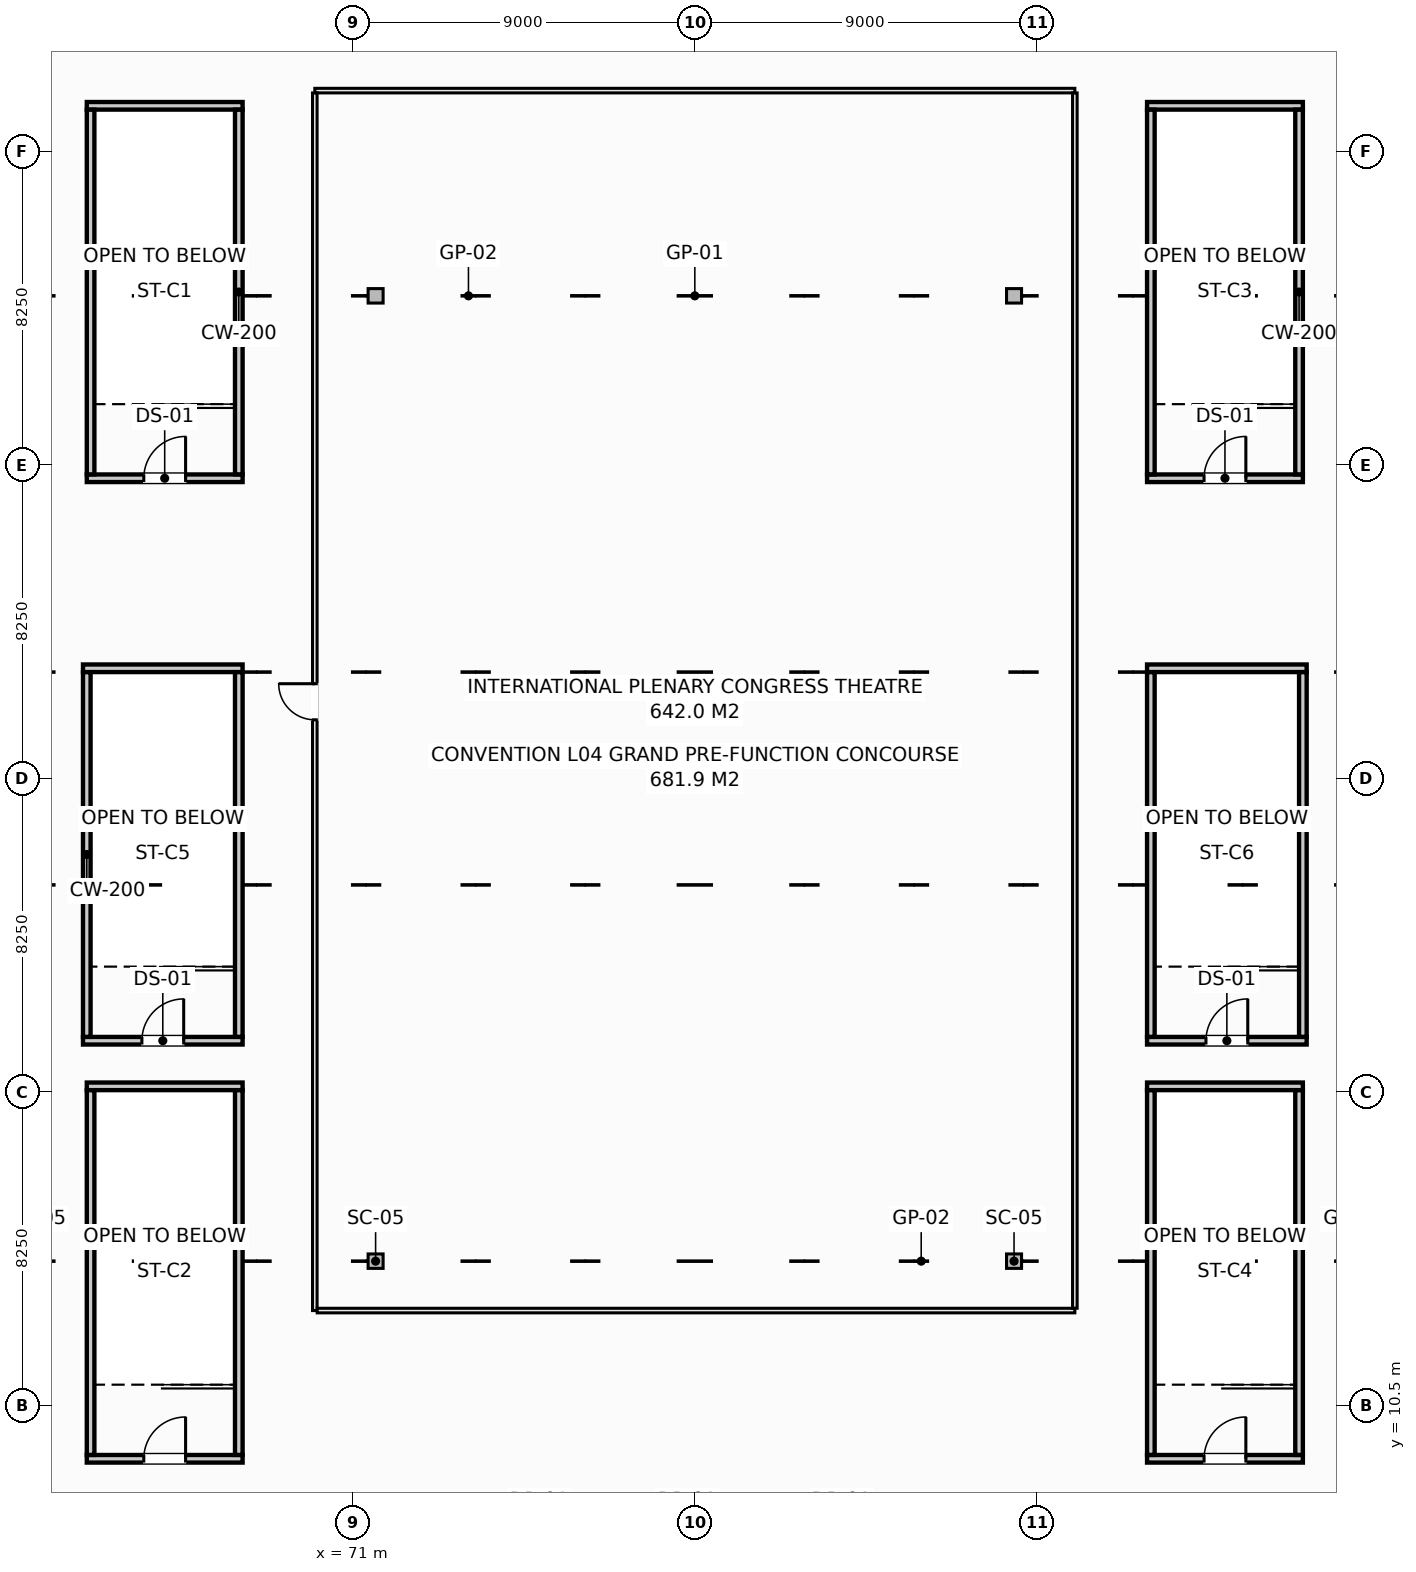
"""IFC4 building model, lengths in metres.
Left out: names, types, materials, properties, quantities, classifications, styles, units other than length and angle.
Written with IfcOpenShell. Run it as: python <this file> out.ifc"""

import sys

from ifc_helpers import new_model, si_unit, direction, frame, frame_2d, origin, origin_2d, place, context, subcontext, project, spatial, rectangle, i_section, extrude, element, fill, save


model = new_model("IFC4")
c1 = context("Model", 3, precision=1e-05, world=origin(), true_north=direction((0.0, 1.0)))
c2 = subcontext(c1, "Body", "Model", "MODEL_VIEW")
j1 = project(units=[si_unit("LENGTHUNIT", "METRE"), si_unit("PLANEANGLEUNIT", "RADIAN")], contexts=[c1])
p1 = place(None, origin())
s1 = spatial("IfcSite", under=j1, at=p1, CompositionType="ELEMENT")
p2 = place(p1, origin())
s2 = spatial("IfcBuilding", under=s1, at=p2, CompositionType="ELEMENT")
p3 = place(p2, frame((0.0, 0.0, 21.0)))
s3 = spatial("IfcBuildingStorey", under=s2, at=p3, CompositionType="ELEMENT", Elevation=21.0)
for number, where, z_axis, x_axis in (
    (1, (71.6, 14.3, -0.24), (0.0, 0.0, 1.0), (1.0, 0.0, 0.0)),
    (2, (71.6, 39.7, -0.24), (0.0, 0.0, 1.0), (1.0, 0.0, 0.0)),
    (3, (88.4, 14.3, -0.24), (0.0, 0.0, 1.0), (1.0, 0.0, 0.0)),
    (4, (88.4, 39.7, -0.24), (0.0, 0.0, 1.0), (1.0, 0.0, 0.0)),
):
    element("IfcColumn", number, at=place(p3, frame(where, z_axis=z_axis, x_axis=x_axis)), inside=s3, PredefinedType="COLUMN", context=c2, shape_type="SweptSolid", body=[
        extrude(i_section(OverallWidth=0.395, OverallDepth=0.38, WebThickness=0.019, FlangeThickness=0.03, at=origin_2d()), origin(), (0.0, 0.0, 1.0), 5.49),
    ])
p4 = place(p3, frame((64.0, 34.9, -0.24), z_axis=(0.0, 0.0, 1.0), x_axis=(1.0, 0.0, 0.0)))
e5 = element("IfcWall", 5, at=p4, inside=s3, PredefinedType="SHEAR", context=c2, shape_type="SweptSolid", body=[
    extrude(rectangle(XDim=4.1, YDim=0.2, at=frame_2d((2.05, 0.0))), origin(), (0.0, 0.0, 1.0), 5.49),
])
p5 = place(p4, frame((1.5, 0.0, 0.24)))
e6 = element("IfcOpeningElement", 6, at=p5, cuts=e5, PredefinedType="OPENING", context=c2, shape_type="SweptSolid", body=[
    extrude(rectangle(XDim=1.1, YDim=2.15, at=frame_2d((0.55, 1.075))), frame((0.0, 0.11, 0.0), z_axis=(0.0, -1.0, 0.0), x_axis=(1.0, 0.0, 0.0)), (0.0, 0.0, 1.0), 0.22),
])
p6 = place(p3, frame((64.0, 44.7, -0.24), z_axis=(0.0, 0.0, 1.0), x_axis=(1.0, 0.0, 0.0)))
e7 = element("IfcWall", 7, at=p6, inside=s3, PredefinedType="SHEAR", context=c2, shape_type="SweptSolid", body=[
    extrude(rectangle(XDim=4.1, YDim=0.2, at=frame_2d((2.05, 0.0))), origin(), (0.0, 0.0, 1.0), 5.49),
])
for number, where, z_axis, x_axis in (
    (8, (64.1, 35.002, -0.24), (0.0, 0.0, 1.0), (0.0, 1.0, 0.0)),
    (9, (68.0, 35.002, -0.24), (0.0, 0.0, 1.0), (0.0, 1.0, 0.0)),
):
    element("IfcWall", number, at=place(p3, frame(where, z_axis=z_axis, x_axis=x_axis)), inside=s3, PredefinedType="SHEAR", context=c2, shape_type="SweptSolid", body=[
        extrude(rectangle(XDim=9.596, YDim=0.2, at=frame_2d((4.798, 0.0))), origin(), (0.0, 0.0, 1.0), 5.49),
    ])
p7 = place(p3, frame((64.0, 9.1, -0.24), z_axis=(0.0, 0.0, 1.0), x_axis=(1.0, 0.0, 0.0)))
e10 = element("IfcWall", 10, at=p7, inside=s3, PredefinedType="SHEAR", context=c2, shape_type="SweptSolid", body=[
    extrude(rectangle(XDim=4.1, YDim=0.2, at=frame_2d((2.05, 0.0))), origin(), (0.0, 0.0, 1.0), 5.49),
])
p8 = place(p7, frame((1.5, 0.0, 0.24)))
e11 = element("IfcOpeningElement", 11, at=p8, cuts=e10, PredefinedType="OPENING", context=c2, shape_type="SweptSolid", body=[
    extrude(rectangle(XDim=1.1, YDim=2.15, at=frame_2d((0.55, 1.075))), frame((0.0, 0.11, 0.0), z_axis=(0.0, -1.0, 0.0), x_axis=(1.0, 0.0, 0.0)), (0.0, 0.0, 1.0), 0.22),
])
p9 = place(p3, frame((64.0, 18.9, -0.24), z_axis=(0.0, 0.0, 1.0), x_axis=(1.0, 0.0, 0.0)))
e12 = element("IfcWall", 12, at=p9, inside=s3, PredefinedType="SHEAR", context=c2, shape_type="SweptSolid", body=[
    extrude(rectangle(XDim=4.1, YDim=0.2, at=frame_2d((2.05, 0.0))), origin(), (0.0, 0.0, 1.0), 5.49),
])
for number, where, z_axis, x_axis in (
    (13, (64.1, 9.202, -0.24), (0.0, 0.0, 1.0), (0.0, 1.0, 0.0)),
    (14, (68.0, 9.202, -0.24), (0.0, 0.0, 1.0), (0.0, 1.0, 0.0)),
):
    element("IfcWall", number, at=place(p3, frame(where, z_axis=z_axis, x_axis=x_axis)), inside=s3, PredefinedType="SHEAR", context=c2, shape_type="SweptSolid", body=[
        extrude(rectangle(XDim=9.596, YDim=0.2, at=frame_2d((4.798, 0.0))), origin(), (0.0, 0.0, 1.0), 5.49),
    ])
p10 = place(p3, frame((91.9, 34.9, -0.24), z_axis=(0.0, 0.0, 1.0), x_axis=(1.0, 0.0, 0.0)))
e15 = element("IfcWall", 15, at=p10, inside=s3, PredefinedType="SHEAR", context=c2, shape_type="SweptSolid", body=[
    extrude(rectangle(XDim=4.1, YDim=0.2, at=frame_2d((2.05, 0.0))), origin(), (0.0, 0.0, 1.0), 5.49),
])
p11 = place(p10, frame((1.5, 0.0, 0.24)))
e16 = element("IfcOpeningElement", 16, at=p11, cuts=e15, PredefinedType="OPENING", context=c2, shape_type="SweptSolid", body=[
    extrude(rectangle(XDim=1.1, YDim=2.15, at=frame_2d((0.55, 1.075))), frame((0.0, 0.11, 0.0), z_axis=(0.0, -1.0, 0.0), x_axis=(1.0, 0.0, 0.0)), (0.0, 0.0, 1.0), 0.22),
])
p12 = place(p3, frame((91.9, 44.7, -0.24), z_axis=(0.0, 0.0, 1.0), x_axis=(1.0, 0.0, 0.0)))
e17 = element("IfcWall", 17, at=p12, inside=s3, PredefinedType="SHEAR", context=c2, shape_type="SweptSolid", body=[
    extrude(rectangle(XDim=4.1, YDim=0.2, at=frame_2d((2.05, 0.0))), origin(), (0.0, 0.0, 1.0), 5.49),
])
for number, where, z_axis, x_axis in (
    (18, (92.0, 35.002, -0.24), (0.0, 0.0, 1.0), (0.0, 1.0, 0.0)),
    (19, (95.9, 35.002, -0.24), (0.0, 0.0, 1.0), (0.0, 1.0, 0.0)),
):
    element("IfcWall", number, at=place(p3, frame(where, z_axis=z_axis, x_axis=x_axis)), inside=s3, PredefinedType="SHEAR", context=c2, shape_type="SweptSolid", body=[
        extrude(rectangle(XDim=9.596, YDim=0.2, at=frame_2d((4.798, 0.0))), origin(), (0.0, 0.0, 1.0), 5.49),
    ])
p13 = place(p3, frame((91.9, 9.1, -0.24), z_axis=(0.0, 0.0, 1.0), x_axis=(1.0, 0.0, 0.0)))
e20 = element("IfcWall", 20, at=p13, inside=s3, PredefinedType="SHEAR", context=c2, shape_type="SweptSolid", body=[
    extrude(rectangle(XDim=4.1, YDim=0.2, at=frame_2d((2.05, 0.0))), origin(), (0.0, 0.0, 1.0), 5.49),
])
p14 = place(p13, frame((1.5, 0.0, 0.24)))
e21 = element("IfcOpeningElement", 21, at=p14, cuts=e20, PredefinedType="OPENING", context=c2, shape_type="SweptSolid", body=[
    extrude(rectangle(XDim=1.1, YDim=2.15, at=frame_2d((0.55, 1.075))), frame((0.0, 0.11, 0.0), z_axis=(0.0, -1.0, 0.0), x_axis=(1.0, 0.0, 0.0)), (0.0, 0.0, 1.0), 0.22),
])
p15 = place(p3, frame((91.9, 18.9, -0.24), z_axis=(0.0, 0.0, 1.0), x_axis=(1.0, 0.0, 0.0)))
e22 = element("IfcWall", 22, at=p15, inside=s3, PredefinedType="SHEAR", context=c2, shape_type="SweptSolid", body=[
    extrude(rectangle(XDim=4.1, YDim=0.2, at=frame_2d((2.05, 0.0))), origin(), (0.0, 0.0, 1.0), 5.49),
])
for number, where, z_axis, x_axis in (
    (23, (92.0, 9.202, -0.24), (0.0, 0.0, 1.0), (0.0, 1.0, 0.0)),
    (24, (95.9, 9.202, -0.24), (0.0, 0.0, 1.0), (0.0, 1.0, 0.0)),
):
    element("IfcWall", number, at=place(p3, frame(where, z_axis=z_axis, x_axis=x_axis)), inside=s3, PredefinedType="SHEAR", context=c2, shape_type="SweptSolid", body=[
        extrude(rectangle(XDim=9.596, YDim=0.2, at=frame_2d((4.798, 0.0))), origin(), (0.0, 0.0, 1.0), 5.49),
    ])
p16 = place(p3, frame((63.9, 20.1, -0.24), z_axis=(0.0, 0.0, 1.0), x_axis=(1.0, 0.0, 0.0)))
e25 = element("IfcWall", 25, at=p16, inside=s3, PredefinedType="SHEAR", context=c2, shape_type="SweptSolid", body=[
    extrude(rectangle(XDim=4.2, YDim=0.2, at=frame_2d((2.1, 0.0))), origin(), (0.0, 0.0, 1.0), 5.49),
])
p17 = place(p16, frame((1.55, 0.0, 0.24)))
e26 = element("IfcOpeningElement", 26, at=p17, cuts=e25, PredefinedType="OPENING", context=c2, shape_type="SweptSolid", body=[
    extrude(rectangle(XDim=1.1, YDim=2.15, at=frame_2d((0.55, 1.075))), frame((0.0, 0.11, 0.0), z_axis=(0.0, -1.0, 0.0), x_axis=(1.0, 0.0, 0.0)), (0.0, 0.0, 1.0), 0.22),
])
p18 = place(p3, frame((63.9, 29.9, -0.24), z_axis=(0.0, 0.0, 1.0), x_axis=(1.0, 0.0, 0.0)))
e27 = element("IfcWall", 27, at=p18, inside=s3, PredefinedType="SHEAR", context=c2, shape_type="SweptSolid", body=[
    extrude(rectangle(XDim=4.2, YDim=0.2, at=frame_2d((2.1, 0.0))), origin(), (0.0, 0.0, 1.0), 5.49),
])
for number, where, z_axis, x_axis in (
    (28, (64.0, 20.202, -0.24), (0.0, 0.0, 1.0), (0.0, 1.0, 0.0)),
    (29, (68.0, 20.202, -0.24), (0.0, 0.0, 1.0), (0.0, 1.0, 0.0)),
):
    element("IfcWall", number, at=place(p3, frame(where, z_axis=z_axis, x_axis=x_axis)), inside=s3, PredefinedType="SHEAR", context=c2, shape_type="SweptSolid", body=[
        extrude(rectangle(XDim=9.596, YDim=0.2, at=frame_2d((4.798, 0.0))), origin(), (0.0, 0.0, 1.0), 5.49),
    ])
p19 = place(p3, frame((91.9, 20.1, -0.24), z_axis=(0.0, 0.0, 1.0), x_axis=(1.0, 0.0, 0.0)))
e30 = element("IfcWall", 30, at=p19, inside=s3, PredefinedType="SHEAR", context=c2, shape_type="SweptSolid", body=[
    extrude(rectangle(XDim=4.2, YDim=0.2, at=frame_2d((2.1, 0.0))), origin(), (0.0, 0.0, 1.0), 5.49),
])
p20 = place(p19, frame((1.55, 0.0, 0.24)))
e31 = element("IfcOpeningElement", 31, at=p20, cuts=e30, PredefinedType="OPENING", context=c2, shape_type="SweptSolid", body=[
    extrude(rectangle(XDim=1.1, YDim=2.15, at=frame_2d((0.55, 1.075))), frame((0.0, 0.11, 0.0), z_axis=(0.0, -1.0, 0.0), x_axis=(1.0, 0.0, 0.0)), (0.0, 0.0, 1.0), 0.22),
])
p21 = place(p3, frame((91.9, 29.9, -0.24), z_axis=(0.0, 0.0, 1.0), x_axis=(1.0, 0.0, 0.0)))
e32 = element("IfcWall", 32, at=p21, inside=s3, PredefinedType="SHEAR", context=c2, shape_type="SweptSolid", body=[
    extrude(rectangle(XDim=4.2, YDim=0.2, at=frame_2d((2.1, 0.0))), origin(), (0.0, 0.0, 1.0), 5.49),
])
for number, where, z_axis, x_axis in (
    (33, (92.0, 20.202, -0.24), (0.0, 0.0, 1.0), (0.0, 1.0, 0.0)),
    (34, (96.0, 20.202, -0.24), (0.0, 0.0, 1.0), (0.0, 1.0, 0.0)),
):
    element("IfcWall", number, at=place(p3, frame(where, z_axis=z_axis, x_axis=x_axis)), inside=s3, PredefinedType="SHEAR", context=c2, shape_type="SweptSolid", body=[
        extrude(rectangle(XDim=9.596, YDim=0.2, at=frame_2d((4.798, 0.0))), origin(), (0.0, 0.0, 1.0), 5.49),
    ])
p22 = place(p3, frame((70.0, 45.1, 0.0), z_axis=(0.0, 0.0, 1.0), x_axis=(1.0, 0.0, 0.0)))
e35 = element("IfcWall", 35, at=p22, inside=s3, PredefinedType="PARTITIONING", context=c2, shape_type="SweptSolid", body=[
    extrude(rectangle(XDim=20.0, YDim=0.12, at=frame_2d((10.0, 0.0))), origin(), (0.0, 0.0, 1.0), 5.25),
])
p23 = place(p3, frame((70.0, 13.0, 0.0), z_axis=(0.0, 0.0, 1.0), x_axis=(0.0, 1.0, 0.0)))
e36 = element("IfcWall", 36, at=p23, inside=s3, PredefinedType="PARTITIONING", context=c2, shape_type="SweptSolid", body=[
    extrude(rectangle(XDim=32.038, YDim=0.12, at=frame_2d((16.019, 0.0))), origin(), (0.0, 0.0, 1.0), 5.25),
])
p24 = place(p23, frame((15.544, 0.0, 0.0)))
e37 = element("IfcOpeningElement", 37, at=p24, cuts=e36, PredefinedType="OPENING", context=c2, shape_type="SweptSolid", body=[
    extrude(rectangle(XDim=0.95, YDim=2.1, at=frame_2d((0.475, 1.05))), frame((0.0, 0.07, 0.0), z_axis=(0.0, -1.0, 0.0), x_axis=(1.0, 0.0, 0.0)), (0.0, 0.0, 1.0), 0.14),
])
p25 = place(p3, frame((70.062, 13.0, 0.0), z_axis=(0.0, 0.0, 1.0), x_axis=(1.0, 0.0, 0.0)))
e38 = element("IfcWall", 38, at=p25, inside=s3, PredefinedType="PARTITIONING", context=c2, shape_type="SweptSolid", body=[
    extrude(rectangle(XDim=19.938, YDim=0.12, at=frame_2d((9.969, 0.0))), origin(), (0.0, 0.0, 1.0), 5.25),
])
p26 = place(p3, frame((90.0, 13.062, 0.0), z_axis=(0.0, 0.0, 1.0), x_axis=(0.0, 1.0, 0.0)))
e39 = element("IfcWall", 39, at=p26, inside=s3, PredefinedType="PARTITIONING", context=c2, shape_type="SweptSolid", body=[
    extrude(rectangle(XDim=31.976, YDim=0.12, at=frame_2d((15.988, 0.0))), origin(), (0.0, 0.0, 1.0), 5.25),
])
p27 = place(p5, origin())
e40 = element("IfcDoor", 40, at=p27, inside=s3, OperationType="SINGLE_SWING_RIGHT", PredefinedType="DOOR", context=c2, shape_type="SweptSolid", body=[
    extrude(rectangle(XDim=1.1, YDim=2.15, at=frame_2d((0.55, 1.075))), frame((0.0, 0.025, 0.0), z_axis=(0.0, -1.0, 0.0), x_axis=(1.0, 0.0, 0.0)), (0.0, 0.0, 1.0), 0.05),
])
fill(e6, e40)
p28 = place(p8, origin())
e41 = element("IfcDoor", 41, at=p28, inside=s3, OperationType="SINGLE_SWING_RIGHT", PredefinedType="DOOR", context=c2, shape_type="SweptSolid", body=[
    extrude(rectangle(XDim=1.1, YDim=2.15, at=frame_2d((0.55, 1.075))), frame((0.0, 0.025, 0.0), z_axis=(0.0, -1.0, 0.0), x_axis=(1.0, 0.0, 0.0)), (0.0, 0.0, 1.0), 0.05),
])
fill(e11, e41)
p29 = place(p11, origin())
e42 = element("IfcDoor", 42, at=p29, inside=s3, OperationType="SINGLE_SWING_RIGHT", PredefinedType="DOOR", context=c2, shape_type="SweptSolid", body=[
    extrude(rectangle(XDim=1.1, YDim=2.15, at=frame_2d((0.55, 1.075))), frame((0.0, 0.025, 0.0), z_axis=(0.0, -1.0, 0.0), x_axis=(1.0, 0.0, 0.0)), (0.0, 0.0, 1.0), 0.05),
])
fill(e16, e42)
p30 = place(p14, origin())
e43 = element("IfcDoor", 43, at=p30, inside=s3, OperationType="SINGLE_SWING_RIGHT", PredefinedType="DOOR", context=c2, shape_type="SweptSolid", body=[
    extrude(rectangle(XDim=1.1, YDim=2.15, at=frame_2d((0.55, 1.075))), frame((0.0, 0.025, 0.0), z_axis=(0.0, -1.0, 0.0), x_axis=(1.0, 0.0, 0.0)), (0.0, 0.0, 1.0), 0.05),
])
fill(e21, e43)
p31 = place(p17, origin())
e44 = element("IfcDoor", 44, at=p31, inside=s3, OperationType="SINGLE_SWING_RIGHT", PredefinedType="DOOR", context=c2, shape_type="SweptSolid", body=[
    extrude(rectangle(XDim=1.1, YDim=2.15, at=frame_2d((0.55, 1.075))), frame((0.0, 0.025, 0.0), z_axis=(0.0, -1.0, 0.0), x_axis=(1.0, 0.0, 0.0)), (0.0, 0.0, 1.0), 0.05),
])
fill(e26, e44)
p32 = place(p20, origin())
e45 = element("IfcDoor", 45, at=p32, inside=s3, OperationType="SINGLE_SWING_RIGHT", PredefinedType="DOOR", context=c2, shape_type="SweptSolid", body=[
    extrude(rectangle(XDim=1.1, YDim=2.15, at=frame_2d((0.55, 1.075))), frame((0.0, 0.025, 0.0), z_axis=(0.0, -1.0, 0.0), x_axis=(1.0, 0.0, 0.0)), (0.0, 0.0, 1.0), 0.05),
])
fill(e31, e45)
p33 = place(p24, origin())
e46 = element("IfcDoor", 46, at=p33, inside=s3, OperationType="SINGLE_SWING_RIGHT", PredefinedType="DOOR", context=c2, shape_type="SweptSolid", body=[
    extrude(rectangle(XDim=0.95, YDim=2.1, at=frame_2d((0.475, 1.05))), frame((0.0, 0.025, 0.0), z_axis=(0.0, -1.0, 0.0), x_axis=(1.0, 0.0, 0.0)), (0.0, 0.0, 1.0), 0.05),
])
fill(e37, e46)
save(model, sys.argv[1])
